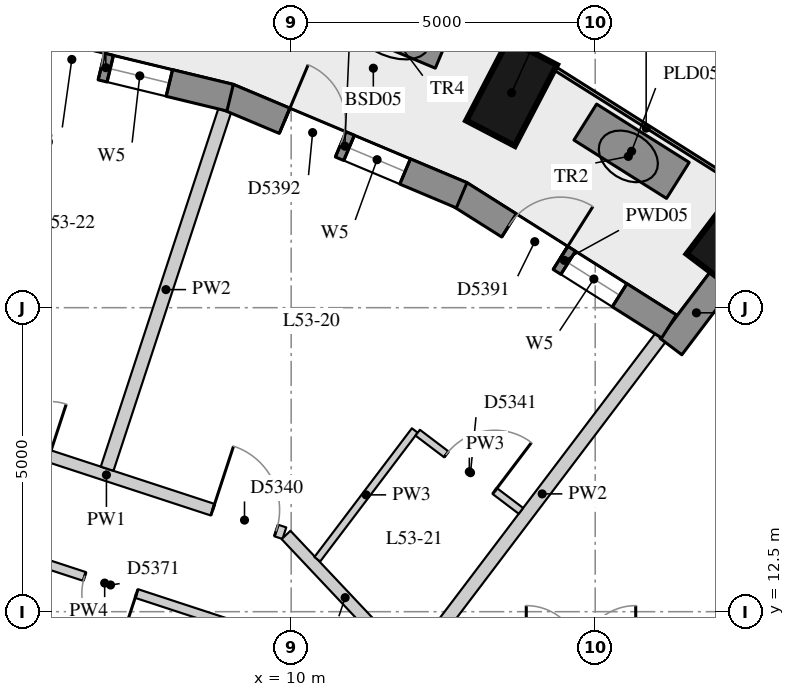
"""IFC4 building model, lengths in metres.
Left out: names, types, materials, properties, quantities, classifications, styles, units other than length and angle.
Written with IfcOpenShell. Run it as: python <this file> out.ifc"""

import sys

from ifc_helpers import new_model, si_unit, direction, frame, frame_2d, origin, origin_2d, place, context, subcontext, project, spatial, rectangle, extrude, element, fill, save


model = new_model("IFC4")
c1 = context("Model", 3, precision=1e-05, world=origin(), true_north=direction((0.0, 1.0)))
c2 = subcontext(c1, "Body", "Model", "MODEL_VIEW")
j1 = project(units=[si_unit("LENGTHUNIT", "METRE"), si_unit("PLANEANGLEUNIT", "RADIAN")], contexts=[c1])
p1 = place(None, origin())
s1 = spatial("IfcSite", under=j1, at=p1, CompositionType="ELEMENT")
p2 = place(p1, origin())
s2 = spatial("IfcBuilding", under=s1, at=p2, CompositionType="ELEMENT")
p3 = place(p2, frame((0.0, 0.0, 189.2)))
s3 = spatial("IfcBuildingStorey", under=s2, at=p3, CompositionType="ELEMENT", Elevation=189.2)
for number, where, z_axis, x_axis in (
    (1, (17.316, 18.71, 0.0), (0.0, 0.0, 1.0), (0.604, 0.797, 0.0)),
    (2, (13.625, 21.035, 0.0), (0.0, 0.0, 1.0), (0.462, 0.887, 0.0)),
):
    element("IfcColumn", number, at=place(p3, frame(where, z_axis=z_axis, x_axis=x_axis)), inside=s3, PredefinedType="COLUMN", context=c2, shape_type="SweptSolid", body=[
        extrude(rectangle(XDim=1.5, YDim=0.9, at=origin_2d()), origin(), (0.0, 0.0, 1.0), 3.3),
    ])
p4 = place(p3, frame((17.085, 17.97, 0.0), z_axis=(0.0, 0.0, 1.0), x_axis=(-0.603644757989, -0.797253414011, 0.0)))
e3 = element("IfcWall", 3, at=p4, inside=s3, PredefinedType="SOLIDWALL", context=c2, shape_type="SweptSolid", body=[
    extrude(rectangle(XDim=1.391, YDim=0.45, at=frame_2d((0.695, 0.0))), origin(), (0.0, 0.0, 1.0), 3.02),
])
p5 = place(p3, frame((16.213, 17.192, 0.0), z_axis=(0.0, 0.0, 1.0), x_axis=(-0.84545185308, 0.534051649303, 0.0)))
e4 = element("IfcWall", 4, at=p5, inside=s3, PredefinedType="SOLIDWALL", context=c2, shape_type="SweptSolid", body=[
    extrude(rectangle(XDim=4.071, YDim=0.45, at=frame_2d((2.036, 0.0))), origin(), (0.0, 0.0, 1.0), 3.02),
])
p6 = place(p5, frame((0.961, 0.0, 0.4)))
e5 = element("IfcOpeningElement", 5, at=p6, cuts=e4, PredefinedType="OPENING", context=c2, shape_type="SweptSolid", body=[
    extrude(rectangle(XDim=1.0, YDim=1.75, at=frame_2d((0.5, 0.875))), frame((0.0, 0.235, 0.0), z_axis=(0.0, -1.0, 0.0), x_axis=(1.0, 0.0, 0.0)), (0.0, 0.0, 1.0), 0.47),
])
p7 = place(p5, frame((2.111, 0.0, 0.0)))
e6 = element("IfcOpeningElement", 6, at=p7, cuts=e4, PredefinedType="OPENING", context=c2, shape_type="SweptSolid", body=[
    extrude(rectangle(XDim=1.0, YDim=2.15, at=frame_2d((0.5, 1.075))), frame((0.0, 0.235, 0.0), z_axis=(0.0, -1.0, 0.0), x_axis=(1.0, 0.0, 0.0)), (0.0, 0.0, 1.0), 0.47),
])
p8 = place(p3, frame((12.804, 19.349, 0.0), z_axis=(0.0, 0.0, 1.0), x_axis=(-0.921751093055, 0.387782055351, 0.0)))
e7 = element("IfcWall", 7, at=p8, inside=s3, PredefinedType="SOLIDWALL", context=c2, shape_type="SweptSolid", body=[
    extrude(rectangle(XDim=4.168, YDim=0.45, at=frame_2d((2.084, 0.0))), origin(), (0.0, 0.0, 1.0), 3.02),
])
p9 = place(p8, frame((1.009, 0.0, 0.4)))
e8 = element("IfcOpeningElement", 8, at=p9, cuts=e7, PredefinedType="OPENING", context=c2, shape_type="SweptSolid", body=[
    extrude(rectangle(XDim=1.0, YDim=1.75, at=frame_2d((0.5, 0.875))), frame((0.0, 0.235, 0.0), z_axis=(0.0, -1.0, 0.0), x_axis=(1.0, 0.0, 0.0)), (0.0, 0.0, 1.0), 0.47),
])
p10 = place(p8, frame((2.159, 0.0, 0.0)))
e9 = element("IfcOpeningElement", 9, at=p10, cuts=e7, PredefinedType="OPENING", context=c2, shape_type="SweptSolid", body=[
    extrude(rectangle(XDim=1.0, YDim=2.15, at=frame_2d((0.5, 1.075))), frame((0.0, 0.235, 0.0), z_axis=(0.0, -1.0, 0.0), x_axis=(1.0, 0.0, 0.0)), (0.0, 0.0, 1.0), 0.47),
])
p11 = place(p3, frame((8.996, 20.954, 0.0), z_axis=(0.0, 0.0, 1.0), x_axis=(-0.971994057868, 0.235005428593, 0.0)))
e10 = element("IfcWall", 10, at=p11, inside=s3, PredefinedType="SOLIDWALL", context=c2, shape_type="SweptSolid", body=[
    extrude(rectangle(XDim=4.208, YDim=0.45, at=frame_2d((2.104, 0.0))), origin(), (0.0, 0.0, 1.0), 3.02),
])
p12 = place(p11, frame((1.029, 0.0, 0.4)))
e11 = element("IfcOpeningElement", 11, at=p12, cuts=e10, PredefinedType="OPENING", context=c2, shape_type="SweptSolid", body=[
    extrude(rectangle(XDim=1.0, YDim=1.75, at=frame_2d((0.5, 0.875))), frame((0.0, 0.235, 0.0), z_axis=(0.0, -1.0, 0.0), x_axis=(1.0, 0.0, 0.0)), (0.0, 0.0, 1.0), 0.47),
])
p13 = place(p11, frame((2.179, 0.0, 0.0)))
e12 = element("IfcOpeningElement", 12, at=p13, cuts=e10, PredefinedType="OPENING", context=c2, shape_type="SweptSolid", body=[
    extrude(rectangle(XDim=1.0, YDim=2.15, at=frame_2d((0.5, 1.075))), frame((0.0, 0.235, 0.0), z_axis=(0.0, -1.0, 0.0), x_axis=(1.0, 0.0, 0.0)), (0.0, 0.0, 1.0), 0.47),
])
p14 = place(p3, frame((16.36, 19.593, 0.0), z_axis=(0.0, 0.0, 1.0), x_axis=(-0.846149017978, 0.532946375703, 0.0)))
e13 = element("IfcWall", 13, at=p14, inside=s3, PredefinedType="USERDEFINED", context=c2, shape_type="SweptSolid", body=[
    extrude(rectangle(XDim=1.8, YDim=0.7, at=frame_2d((0.9, 0.0))), origin(), (0.0, 0.0, 1.0), 0.75),
])
p15 = place(p3, frame((12.506, 21.762, 0.0), z_axis=(0.0, 0.0, 1.0), x_axis=(-0.922155368213, 0.386819695564, 0.0)))
e14 = element("IfcWall", 14, at=p15, inside=s3, PredefinedType="USERDEFINED", context=c2, shape_type="SweptSolid", body=[
    extrude(rectangle(XDim=1.8, YDim=0.7, at=frame_2d((0.9, 0.0))), origin(), (0.0, 0.0, 1.0), 0.75),
])
p16 = place(p3, frame((4.035, 15.708, 0.0), z_axis=(0.0, 0.0, 1.0), x_axis=(0.950331063317, -0.31124085544, 0.0)))
e15 = element("IfcWall", 15, at=p16, inside=s3, PredefinedType="PARTITIONING", context=c2, shape_type="SweptSolid", body=[
    extrude(rectangle(XDim=6.159, YDim=0.2, at=frame_2d((3.08, 0.0))), origin(), (0.0, 0.0, 1.0), 3.02),
])
p17 = place(p16, frame((4.919, 0.0, 0.0)))
e16 = element("IfcOpeningElement", 16, at=p17, cuts=e15, PredefinedType="OPENING", context=c2, shape_type="SweptSolid", body=[
    extrude(rectangle(XDim=1.1, YDim=2.1, at=frame_2d((0.55, 1.05))), frame((0.0, 0.11, 0.0), z_axis=(0.0, -1.0, 0.0), x_axis=(1.0, 0.0, 0.0)), (0.0, 0.0, 1.0), 0.22),
])
p18 = place(p16, frame((1.189, 0.0, 0.0)))
e17 = element("IfcOpeningElement", 17, at=p18, cuts=e15, PredefinedType="OPENING", context=c2, shape_type="SweptSolid", body=[
    extrude(rectangle(XDim=0.9, YDim=2.1, at=frame_2d((0.45, 1.05))), frame((0.0, 0.11, 0.0), z_axis=(0.0, -1.0, 0.0), x_axis=(1.0, 0.0, 0.0)), (0.0, 0.0, 1.0), 0.22),
])
p19 = place(p3, frame((9.916, 13.762, 0.0), z_axis=(0.0, 0.0, 1.0), x_axis=(0.686041532799, -0.727562378958, 0.0)))
e18 = element("IfcWall", 18, at=p19, inside=s3, PredefinedType="PARTITIONING", context=c2, shape_type="SweptSolid", body=[
    extrude(rectangle(XDim=2.834, YDim=0.2, at=frame_2d((1.417, 0.0))), origin(), (0.0, 0.0, 1.0), 3.02),
])
p20 = place(p3, frame((4.917, 13.631, 0.0), z_axis=(0.0, 0.0, 1.0), x_axis=(0.950299632499, -0.311336808733, 0.0)))
e19 = element("IfcWall", 19, at=p20, inside=s3, PredefinedType="PARTITIONING", context=c2, shape_type="SweptSolid", body=[
    extrude(rectangle(XDim=4.241, YDim=0.15, at=frame_2d((2.121, 0.0))), origin(), (0.0, 0.0, 1.0), 3.02),
])
p21 = place(p20, frame((1.773, 0.0, 0.0)))
e20 = element("IfcOpeningElement", 20, at=p21, cuts=e19, PredefinedType="OPENING", context=c2, shape_type="SweptSolid", body=[
    extrude(rectangle(XDim=0.9, YDim=2.1, at=frame_2d((0.45, 1.05))), frame((0.0, 0.085, 0.0), z_axis=(0.0, -1.0, 0.0), x_axis=(1.0, 0.0, 0.0)), (0.0, 0.0, 1.0), 0.17),
])
p22 = place(p3, frame((16.077, 17.011, 0.0), z_axis=(0.0, 0.0, 1.0), x_axis=(-0.603635635975, -0.797260320712, 0.0)))
e21 = element("IfcWall", 21, at=p22, inside=s3, PredefinedType="PARTITIONING", context=c2, shape_type="SweptSolid", body=[
    extrude(rectangle(XDim=6.457, YDim=0.22, at=frame_2d((3.229, 0.0))), origin(), (0.0, 0.0, 1.0), 3.02),
])
p23 = place(p3, frame((8.908, 20.743, 0.0), z_axis=(0.0, 0.0, 1.0), x_axis=(-0.311984764468, -0.950087104817, 0.0)))
e22 = element("IfcWall", 22, at=p23, inside=s3, PredefinedType="PARTITIONING", context=c2, shape_type="SweptSolid", body=[
    extrude(rectangle(XDim=6.202, YDim=0.22, at=frame_2d((3.101, 0.0))), origin(), (0.0, 0.0, 1.0), 3.02),
])
p24 = place(p3, frame((10.43, 13.363, 0.0), z_axis=(0.0, 0.0, 1.0), x_axis=(0.603597479969, 0.797289208616, 0.0)))
e23 = element("IfcWall", 23, at=p24, inside=s3, PredefinedType="PARTITIONING", context=c2, shape_type="SweptSolid", body=[
    extrude(rectangle(XDim=2.656, YDim=0.12, at=frame_2d((1.328, 0.0))), origin(), (0.0, 0.0, 1.0), 3.02),
])
p25 = place(p3, frame((12.081, 15.444, 0.0), z_axis=(0.0, 0.0, 1.0), x_axis=(0.797240905551, -0.603661277967, 0.0)))
e24 = element("IfcWall", 24, at=p25, inside=s3, PredefinedType="PARTITIONING", context=c2, shape_type="SweptSolid", body=[
    extrude(rectangle(XDim=2.13, YDim=0.12, at=frame_2d((1.065, 0.0))), origin(), (0.0, 0.0, 1.0), 3.02),
])
p26 = place(p25, frame((0.59, 0.0, 0.0)))
e25 = element("IfcOpeningElement", 25, at=p26, cuts=e24, PredefinedType="OPENING", context=c2, shape_type="SweptSolid", body=[
    extrude(rectangle(XDim=1.0, YDim=2.1, at=frame_2d((0.5, 1.05))), frame((0.0, 0.07, 0.0), z_axis=(0.0, -1.0, 0.0), x_axis=(1.0, 0.0, 0.0)), (0.0, 0.0, 1.0), 0.14),
])
p27 = place(p6, origin())
e26 = element("IfcWindow", 26, at=p27, inside=s3, PartitioningType="SINGLE_PANEL", PredefinedType="WINDOW", context=c2, shape_type="SweptSolid", body=[
    extrude(rectangle(XDim=1.0, YDim=1.75, at=frame_2d((0.5, 0.875))), frame((0.0, 0.035, 0.0), z_axis=(0.0, -1.0, 0.0), x_axis=(1.0, 0.0, 0.0)), (0.0, 0.0, 1.0), 0.06),
])
fill(e5, e26)
p28 = place(p7, frame((1.0, 0.0, 0.0), z_axis=(0.0, 0.0, 1.0), x_axis=(-1.0, 0.0, 0.0)))
e27 = element("IfcDoor", 27, at=p28, inside=s3, OperationType="SINGLE_SWING_RIGHT", PredefinedType="DOOR", context=c2, shape_type="SweptSolid", body=[
    extrude(rectangle(XDim=1.0, YDim=2.15, at=frame_2d((0.5, 1.075))), frame((0.0, 0.075, 0.0), z_axis=(0.0, -1.0, 0.0), x_axis=(1.0, 0.0, 0.0)), (0.0, 0.0, 1.0), 0.05),
])
fill(e6, e27)
p29 = place(p9, origin())
e28 = element("IfcWindow", 28, at=p29, inside=s3, PartitioningType="SINGLE_PANEL", PredefinedType="WINDOW", context=c2, shape_type="SweptSolid", body=[
    extrude(rectangle(XDim=1.0, YDim=1.75, at=frame_2d((0.5, 0.875))), frame((0.0, 0.035, 0.0), z_axis=(0.0, -1.0, 0.0), x_axis=(1.0, 0.0, 0.0)), (0.0, 0.0, 1.0), 0.06),
])
fill(e8, e28)
p30 = place(p10, frame((1.0, 0.0, 0.0), z_axis=(0.0, 0.0, 1.0), x_axis=(-1.0, 0.0, 0.0)))
e29 = element("IfcDoor", 29, at=p30, inside=s3, OperationType="SINGLE_SWING_LEFT", PredefinedType="DOOR", context=c2, shape_type="SweptSolid", body=[
    extrude(rectangle(XDim=1.0, YDim=2.15, at=frame_2d((0.5, 1.075))), frame((0.0, 0.075, 0.0), z_axis=(0.0, -1.0, 0.0), x_axis=(1.0, 0.0, 0.0)), (0.0, 0.0, 1.0), 0.05),
])
fill(e9, e29)
p31 = place(p12, origin())
e30 = element("IfcWindow", 30, at=p31, inside=s3, PartitioningType="SINGLE_PANEL", PredefinedType="WINDOW", context=c2, shape_type="SweptSolid", body=[
    extrude(rectangle(XDim=1.0, YDim=1.75, at=frame_2d((0.5, 0.875))), frame((0.0, 0.035, 0.0), z_axis=(0.0, -1.0, 0.0), x_axis=(1.0, 0.0, 0.0)), (0.0, 0.0, 1.0), 0.06),
])
fill(e11, e30)
p32 = place(p13, frame((1.0, 0.0, 0.0), z_axis=(0.0, 0.0, 1.0), x_axis=(-1.0, 0.0, 0.0)))
e31 = element("IfcDoor", 31, at=p32, inside=s3, OperationType="SINGLE_SWING_LEFT", PredefinedType="DOOR", context=c2, shape_type="SweptSolid", body=[
    extrude(rectangle(XDim=1.0, YDim=2.15, at=frame_2d((0.5, 1.075))), frame((0.0, 0.075, 0.0), z_axis=(0.0, -1.0, 0.0), x_axis=(1.0, 0.0, 0.0)), (0.0, 0.0, 1.0), 0.05),
])
fill(e12, e31)
p33 = place(p17, origin())
e32 = element("IfcDoor", 32, at=p33, inside=s3, OperationType="SINGLE_SWING_LEFT", PredefinedType="DOOR", context=c2, shape_type="SweptSolid", body=[
    extrude(rectangle(XDim=1.1, YDim=2.1, at=frame_2d((0.55, 1.05))), frame((0.0, 0.025, 0.0), z_axis=(0.0, -1.0, 0.0), x_axis=(1.0, 0.0, 0.0)), (0.0, 0.0, 1.0), 0.05),
])
fill(e16, e32)
p34 = place(p26, origin())
e33 = element("IfcDoor", 33, at=p34, inside=s3, OperationType="SINGLE_SWING_RIGHT", PredefinedType="DOOR", context=c2, shape_type="SweptSolid", body=[
    extrude(rectangle(XDim=1.0, YDim=2.1, at=frame_2d((0.5, 1.05))), frame((0.0, 0.025, 0.0), z_axis=(0.0, -1.0, 0.0), x_axis=(1.0, 0.0, 0.0)), (0.0, 0.0, 1.0), 0.05),
])
fill(e25, e33)
p35 = place(p21, origin())
e34 = element("IfcDoor", 34, at=p35, inside=s3, OperationType="SINGLE_SWING_LEFT", PredefinedType="DOOR", context=c2, shape_type="SweptSolid", body=[
    extrude(rectangle(XDim=0.9, YDim=2.1, at=frame_2d((0.45, 1.05))), frame((0.0, 0.025, 0.0), z_axis=(0.0, -1.0, 0.0), x_axis=(1.0, 0.0, 0.0)), (0.0, 0.0, 1.0), 0.05),
])
fill(e20, e34)
save(model, sys.argv[1])
